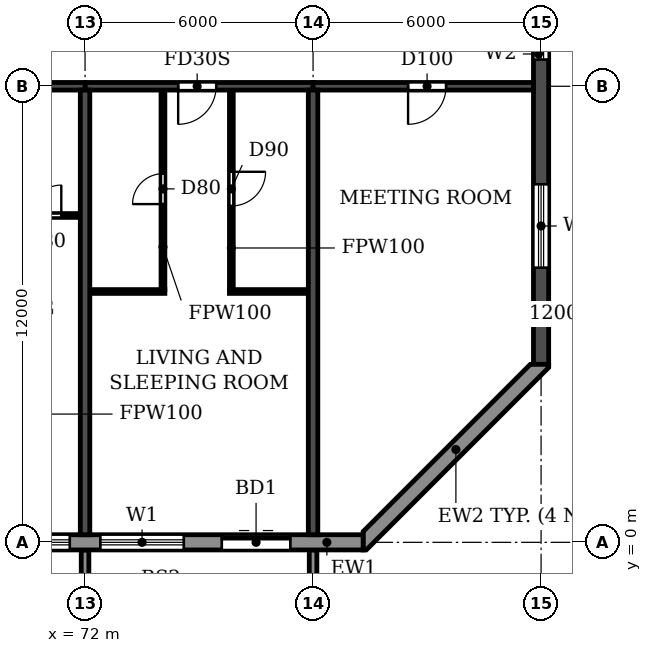
"""IFC4 building model, lengths in metres.
Left out: names, types, materials, properties, quantities, classifications, styles, units other than length and angle.
Written with IfcOpenShell. Run it as: python <this file> out.ifc"""

import sys

from ifc_helpers import new_model, si_unit, direction, frame, frame_2d, origin, place, context, subcontext, project, spatial, polyline, rectangle, outline, extrude, source, transform, mapped, element, fill, save


model = new_model("IFC4")
c1 = context("Model", 3, precision=1e-05, world=origin(), true_north=direction((0.0, 1.0)))
c2 = subcontext(c1, "Body", "Model", "MODEL_VIEW")
j1 = project(units=[si_unit("LENGTHUNIT", "METRE"), si_unit("PLANEANGLEUNIT", "RADIAN")], contexts=[c1])
p1 = place(None, origin())
s1 = spatial("IfcSite", under=j1, at=p1, CompositionType="ELEMENT")
p2 = place(p1, origin())
s2 = spatial("IfcBuilding", under=s1, at=p2, CompositionType="ELEMENT")
p3 = place(p2, frame((0.0, 0.0, 257.7)))
s3 = spatial("IfcBuildingStorey", under=s2, at=p3, CompositionType="ELEMENT", Elevation=257.7)
for number, where, z_axis, x_axis in (
    (1, (72.0, 0.2, 0.0), (0.0, 0.0, 1.0), (0.0, 1.0, 0.0)),
    (2, (78.0, 0.2, 0.0), (0.0, 0.0, 1.0), (0.0, 1.0, 0.0)),
):
    element("IfcWall", number, at=place(p3, frame(where, z_axis=z_axis, x_axis=x_axis)), inside=s3, PredefinedType="SHEAR", context=c2, shape_type="SweptSolid", body=[
        extrude(rectangle(XDim=11.7, YDim=0.25, at=frame_2d((5.85, 0.0))), origin(), (0.0, 0.0, 1.0), 3.0),
    ])
p4 = place(p3, frame((84.0, 4.683, 0.0), z_axis=(0.0, 0.0, 1.0), x_axis=(0.0, 1.0, 0.0)))
e3 = element("IfcWall", 3, at=p4, inside=s3, PredefinedType="SHEAR", context=c2, shape_type="SweptSolid", body=[
    extrude(rectangle(XDim=31.834, YDim=0.4, at=frame_2d((15.917, 0.0))), origin(), (0.0, 0.0, 1.0), 3.0),
])
p5 = place(p4, frame((23.817, 0.0, 0.9)))
e4 = element("IfcOpeningElement", 4, at=p5, cuts=e3, PredefinedType="OPENING", context=c2, shape_type="SweptSolid", body=[
    extrude(rectangle(XDim=1.2, YDim=1.5, at=frame_2d((0.6, 0.75))), frame((0.0, 0.21, 0.0), z_axis=(0.0, -1.0, 0.0), x_axis=(1.0, 0.0, 0.0)), (0.0, 0.0, 1.0), 0.42),
])
p6 = place(p4, frame((8.017, 0.0, 0.9)))
e5 = element("IfcOpeningElement", 5, at=p6, cuts=e3, PredefinedType="OPENING", context=c2, shape_type="SweptSolid", body=[
    extrude(rectangle(XDim=1.2, YDim=1.5, at=frame_2d((0.6, 0.75))), frame((0.0, 0.21, 0.0), z_axis=(0.0, -1.0, 0.0), x_axis=(1.0, 0.0, 0.0)), (0.0, 0.0, 1.0), 0.42),
])
p7 = place(p4, frame((27.694, 0.0, 0.6)))
e6 = element("IfcOpeningElement", 6, at=p7, cuts=e3, PredefinedType="OPENING", context=c2, shape_type="SweptSolid", body=[
    extrude(rectangle(XDim=2.2, YDim=1.8, at=frame_2d((1.1, 0.9))), frame((0.0, 0.21, 0.0), z_axis=(0.0, -1.0, 0.0), x_axis=(1.0, 0.0, 0.0)), (0.0, 0.0, 1.0), 0.42),
])
p8 = place(p4, frame((2.541, 0.0, 0.6)))
e7 = element("IfcOpeningElement", 7, at=p8, cuts=e3, PredefinedType="OPENING", context=c2, shape_type="SweptSolid", body=[
    extrude(rectangle(XDim=2.2, YDim=1.8, at=frame_2d((1.1, 0.9))), frame((0.0, 0.21, 0.0), z_axis=(0.0, -1.0, 0.0), x_axis=(1.0, 0.0, 0.0)), (0.0, 0.0, 1.0), 0.42),
])
p9 = place(p4, frame((15.917, 0.0, 0.9)))
e8 = element("IfcOpeningElement", 8, at=p9, cuts=e3, PredefinedType="OPENING", context=c2, shape_type="SweptSolid", body=[
    extrude(rectangle(XDim=1.2, YDim=1.5, at=frame_2d((0.6, 0.75))), frame((0.0, 0.21, 0.0), z_axis=(0.0, -1.0, 0.0), x_axis=(1.0, 0.0, 0.0)), (0.0, 0.0, 1.0), 0.42),
])
p10 = place(p3, frame((66.0, 12.0, 0.0), z_axis=(0.0, 0.0, 1.0), x_axis=(1.0, 0.0, 0.0)))
e9 = element("IfcWall", 9, at=p10, inside=s3, PredefinedType="SHEAR", context=c2, shape_type="SweptSolid", body=[
    extrude(rectangle(XDim=6.0, YDim=0.2, at=frame_2d((3.0, 0.0))), origin(), (0.0, 0.0, 1.0), 2.4),
])
p11 = place(p10, frame((2.55, 0.0, 0.0)))
e10 = element("IfcOpeningElement", 10, at=p11, cuts=e9, PredefinedType="OPENING", context=c2, shape_type="SweptSolid", body=[
    extrude(rectangle(XDim=1.0, YDim=2.1, at=frame_2d((0.5, 1.05))), frame((0.0, 0.11, 0.0), z_axis=(0.0, -1.0, 0.0), x_axis=(1.0, 0.0, 0.0)), (0.0, 0.0, 1.0), 0.22),
])
p12 = place(p3, frame((72.0, 12.0, 0.0), z_axis=(0.0, 0.0, 1.0), x_axis=(1.0, 0.0, 0.0)))
e11 = element("IfcWall", 11, at=p12, inside=s3, PredefinedType="SHEAR", context=c2, shape_type="SweptSolid", body=[
    extrude(rectangle(XDim=6.0, YDim=0.2, at=frame_2d((3.0, 0.0))), origin(), (0.0, 0.0, 1.0), 2.4),
])
p13 = place(p12, frame((2.45, 0.0, 0.0)))
e12 = element("IfcOpeningElement", 12, at=p13, cuts=e11, PredefinedType="OPENING", context=c2, shape_type="SweptSolid", body=[
    extrude(rectangle(XDim=1.0, YDim=2.1, at=frame_2d((0.5, 1.05))), frame((0.0, 0.11, 0.0), z_axis=(0.0, -1.0, 0.0), x_axis=(1.0, 0.0, 0.0)), (0.0, 0.0, 1.0), 0.22),
])
p14 = place(p3, frame((78.0, 12.0, 0.0), z_axis=(0.0, 0.0, 1.0), x_axis=(1.0, 0.0, 0.0)))
e13 = element("IfcWall", 13, at=p14, inside=s3, PredefinedType="SHEAR", context=c2, shape_type="SweptSolid", body=[
    extrude(rectangle(XDim=5.8, YDim=0.2, at=frame_2d((2.9, 0.0))), origin(), (0.0, 0.0, 1.0), 2.4),
])
p15 = place(p14, frame((2.5, 0.0, 0.0)))
e14 = element("IfcOpeningElement", 14, at=p15, cuts=e13, PredefinedType="OPENING", context=c2, shape_type="SweptSolid", body=[
    extrude(rectangle(XDim=1.0, YDim=2.1, at=frame_2d((0.5, 1.05))), frame((0.0, 0.11, 0.0), z_axis=(0.0, -1.0, 0.0), x_axis=(1.0, 0.0, 0.0)), (0.0, 0.0, 1.0), 0.22),
])
p16 = place(p3, frame((22.683, 0.0, 0.0), z_axis=(0.0, 0.0, 1.0), x_axis=(1.0, 0.0, 0.0)))
e15 = element("IfcWall", 15, at=p16, inside=s3, PredefinedType="STANDARD", context=c2, shape_type="SweptSolid", body=[
    extrude(rectangle(XDim=56.634, YDim=0.4, at=frame_2d((28.317, 0.0))), origin(), (0.0, 0.0, 1.0), 3.0),
])
p17 = place(p16, frame((1.717, 0.0, 0.9)))
e16 = element("IfcOpeningElement", 16, at=p17, cuts=e15, PredefinedType="OPENING", context=c2, shape_type="SweptSolid", body=[
    extrude(rectangle(XDim=2.2, YDim=1.5, at=frame_2d((1.1, 0.75))), frame((0.0, 0.21, 0.0), z_axis=(0.0, -1.0, 0.0), x_axis=(1.0, 0.0, 0.0)), (0.0, 0.0, 1.0), 0.42),
])
p18 = place(p16, frame((4.917, 0.0, 0.0)))
e17 = element("IfcOpeningElement", 17, at=p18, cuts=e15, PredefinedType="OPENING", context=c2, shape_type="SweptSolid", body=[
    extrude(rectangle(XDim=1.8, YDim=2.4, at=frame_2d((0.9, 1.2))), frame((0.0, 0.21, 0.0), z_axis=(0.0, -1.0, 0.0), x_axis=(1.0, 0.0, 0.0)), (0.0, 0.0, 1.0), 0.42),
])
p19 = place(p16, frame((7.717, 0.0, 0.9)))
e18 = element("IfcOpeningElement", 18, at=p19, cuts=e15, PredefinedType="OPENING", context=c2, shape_type="SweptSolid", body=[
    extrude(rectangle(XDim=2.2, YDim=1.5, at=frame_2d((1.1, 0.75))), frame((0.0, 0.21, 0.0), z_axis=(0.0, -1.0, 0.0), x_axis=(1.0, 0.0, 0.0)), (0.0, 0.0, 1.0), 0.42),
])
p20 = place(p16, frame((10.717, 0.0, 0.9)))
e19 = element("IfcOpeningElement", 19, at=p20, cuts=e15, PredefinedType="OPENING", context=c2, shape_type="SweptSolid", body=[
    extrude(rectangle(XDim=2.2, YDim=1.5, at=frame_2d((1.1, 0.75))), frame((0.0, 0.21, 0.0), z_axis=(0.0, -1.0, 0.0), x_axis=(1.0, 0.0, 0.0)), (0.0, 0.0, 1.0), 0.42),
])
p21 = place(p16, frame((13.717, 0.0, 0.9)))
e20 = element("IfcOpeningElement", 20, at=p21, cuts=e15, PredefinedType="OPENING", context=c2, shape_type="SweptSolid", body=[
    extrude(rectangle(XDim=2.2, YDim=1.5, at=frame_2d((1.1, 0.75))), frame((0.0, 0.21, 0.0), z_axis=(0.0, -1.0, 0.0), x_axis=(1.0, 0.0, 0.0)), (0.0, 0.0, 1.0), 0.42),
])
p22 = place(p16, frame((16.917, 0.0, 0.0)))
e21 = element("IfcOpeningElement", 21, at=p22, cuts=e15, PredefinedType="OPENING", context=c2, shape_type="SweptSolid", body=[
    extrude(rectangle(XDim=1.8, YDim=2.4, at=frame_2d((0.9, 1.2))), frame((0.0, 0.21, 0.0), z_axis=(0.0, -1.0, 0.0), x_axis=(1.0, 0.0, 0.0)), (0.0, 0.0, 1.0), 0.42),
])
p23 = place(p16, frame((19.717, 0.0, 0.9)))
e22 = element("IfcOpeningElement", 22, at=p23, cuts=e15, PredefinedType="OPENING", context=c2, shape_type="SweptSolid", body=[
    extrude(rectangle(XDim=2.2, YDim=1.5, at=frame_2d((1.1, 0.75))), frame((0.0, 0.21, 0.0), z_axis=(0.0, -1.0, 0.0), x_axis=(1.0, 0.0, 0.0)), (0.0, 0.0, 1.0), 0.42),
])
p24 = place(p16, frame((22.717, 0.0, 0.9)))
e23 = element("IfcOpeningElement", 23, at=p24, cuts=e15, PredefinedType="OPENING", context=c2, shape_type="SweptSolid", body=[
    extrude(rectangle(XDim=2.2, YDim=1.5, at=frame_2d((1.1, 0.75))), frame((0.0, 0.21, 0.0), z_axis=(0.0, -1.0, 0.0), x_axis=(1.0, 0.0, 0.0)), (0.0, 0.0, 1.0), 0.42),
])
p25 = place(p16, frame((25.717, 0.0, 0.9)))
e24 = element("IfcOpeningElement", 24, at=p25, cuts=e15, PredefinedType="OPENING", context=c2, shape_type="SweptSolid", body=[
    extrude(rectangle(XDim=2.2, YDim=1.5, at=frame_2d((1.1, 0.75))), frame((0.0, 0.21, 0.0), z_axis=(0.0, -1.0, 0.0), x_axis=(1.0, 0.0, 0.0)), (0.0, 0.0, 1.0), 0.42),
])
p26 = place(p16, frame((28.917, 0.0, 0.0)))
e25 = element("IfcOpeningElement", 25, at=p26, cuts=e15, PredefinedType="OPENING", context=c2, shape_type="SweptSolid", body=[
    extrude(rectangle(XDim=1.8, YDim=2.4, at=frame_2d((0.9, 1.2))), frame((0.0, 0.21, 0.0), z_axis=(0.0, -1.0, 0.0), x_axis=(1.0, 0.0, 0.0)), (0.0, 0.0, 1.0), 0.42),
])
p27 = place(p16, frame((31.717, 0.0, 0.9)))
e26 = element("IfcOpeningElement", 26, at=p27, cuts=e15, PredefinedType="OPENING", context=c2, shape_type="SweptSolid", body=[
    extrude(rectangle(XDim=2.2, YDim=1.5, at=frame_2d((1.1, 0.75))), frame((0.0, 0.21, 0.0), z_axis=(0.0, -1.0, 0.0), x_axis=(1.0, 0.0, 0.0)), (0.0, 0.0, 1.0), 0.42),
])
p28 = place(p16, frame((34.717, 0.0, 0.9)))
e27 = element("IfcOpeningElement", 27, at=p28, cuts=e15, PredefinedType="OPENING", context=c2, shape_type="SweptSolid", body=[
    extrude(rectangle(XDim=2.2, YDim=1.5, at=frame_2d((1.1, 0.75))), frame((0.0, 0.21, 0.0), z_axis=(0.0, -1.0, 0.0), x_axis=(1.0, 0.0, 0.0)), (0.0, 0.0, 1.0), 0.42),
])
p29 = place(p16, frame((37.717, 0.0, 0.9)))
e28 = element("IfcOpeningElement", 28, at=p29, cuts=e15, PredefinedType="OPENING", context=c2, shape_type="SweptSolid", body=[
    extrude(rectangle(XDim=2.2, YDim=1.5, at=frame_2d((1.1, 0.75))), frame((0.0, 0.21, 0.0), z_axis=(0.0, -1.0, 0.0), x_axis=(1.0, 0.0, 0.0)), (0.0, 0.0, 1.0), 0.42),
])
p30 = place(p16, frame((40.917, 0.0, 0.0)))
e29 = element("IfcOpeningElement", 29, at=p30, cuts=e15, PredefinedType="OPENING", context=c2, shape_type="SweptSolid", body=[
    extrude(rectangle(XDim=1.8, YDim=2.4, at=frame_2d((0.9, 1.2))), frame((0.0, 0.21, 0.0), z_axis=(0.0, -1.0, 0.0), x_axis=(1.0, 0.0, 0.0)), (0.0, 0.0, 1.0), 0.42),
])
p31 = place(p16, frame((43.717, 0.0, 0.9)))
e30 = element("IfcOpeningElement", 30, at=p31, cuts=e15, PredefinedType="OPENING", context=c2, shape_type="SweptSolid", body=[
    extrude(rectangle(XDim=2.2, YDim=1.5, at=frame_2d((1.1, 0.75))), frame((0.0, 0.21, 0.0), z_axis=(0.0, -1.0, 0.0), x_axis=(1.0, 0.0, 0.0)), (0.0, 0.0, 1.0), 0.42),
])
p32 = place(p16, frame((46.717, 0.0, 0.9)))
e31 = element("IfcOpeningElement", 31, at=p32, cuts=e15, PredefinedType="OPENING", context=c2, shape_type="SweptSolid", body=[
    extrude(rectangle(XDim=2.2, YDim=1.5, at=frame_2d((1.1, 0.75))), frame((0.0, 0.21, 0.0), z_axis=(0.0, -1.0, 0.0), x_axis=(1.0, 0.0, 0.0)), (0.0, 0.0, 1.0), 0.42),
])
p33 = place(p16, frame((49.717, 0.0, 0.9)))
e32 = element("IfcOpeningElement", 32, at=p33, cuts=e15, PredefinedType="OPENING", context=c2, shape_type="SweptSolid", body=[
    extrude(rectangle(XDim=2.2, YDim=1.5, at=frame_2d((1.1, 0.75))), frame((0.0, 0.21, 0.0), z_axis=(0.0, -1.0, 0.0), x_axis=(1.0, 0.0, 0.0)), (0.0, 0.0, 1.0), 0.42),
])
p34 = place(p16, frame((52.917, 0.0, 0.0)))
e33 = element("IfcOpeningElement", 33, at=p34, cuts=e15, PredefinedType="OPENING", context=c2, shape_type="SweptSolid", body=[
    extrude(rectangle(XDim=1.8, YDim=2.4, at=frame_2d((0.9, 1.2))), frame((0.0, 0.21, 0.0), z_axis=(0.0, -1.0, 0.0), x_axis=(1.0, 0.0, 0.0)), (0.0, 0.0, 1.0), 0.42),
])
p35 = place(p3, origin())
e34 = element("IfcWall", 34, at=p35, inside=s3, PredefinedType="STANDARD", context=c2, shape_type="SweptSolid", body=[
    extrude(outline(polyline([(79.317, -0.2), (79.4, -0.2), (84.2, 4.6), (84.2, 4.683), (83.717, 4.683), (79.317, 0.283), (79.317, -0.2)])), origin(), (0.0, 0.0, 1.0), 3.0),
])
m1 = source(origin(), c2, "Body", "SweptSolid", [
    extrude(outline(polyline([(0.0, 0.0), (0.2, 0.0), (0.2, 1.65), (0.0, 1.65), (0.0, 0.0)])), origin(), (0.0, 0.0, 1.0), 3.1),
])
for number, where in (
    (35, (71.9, -1.85, 0.0)),
    (36, (77.9, -1.85, 0.0)),
):
    element("IfcWall", number, at=place(p3, frame(where)), inside=s3, PredefinedType="STANDARD", context=c2, shape_type="MappedRepresentation", body=[
        mapped(m1, transform((0.0, 0.0, 0.0))),
    ])
p36 = place(p3, frame((72.135, 6.6, 0.0), z_axis=(0.0, 0.0, 1.0), x_axis=(1.0, 0.0, 0.0)))
e37 = element("IfcWall", 37, at=p36, inside=s3, PredefinedType="PARTITIONING", context=c2, shape_type="SweptSolid", body=[
    extrude(rectangle(XDim=1.965, YDim=0.1, at=frame_2d((0.982, 0.0))), origin(), (0.0, 0.0, 1.0), 3.0),
])
p37 = place(p3, frame((75.8, 6.6, 0.0), z_axis=(0.0, 0.0, 1.0), x_axis=(1.0, 0.0, 0.0)))
e38 = element("IfcWall", 38, at=p37, inside=s3, PredefinedType="PARTITIONING", context=c2, shape_type="SweptSolid", body=[
    extrude(rectangle(XDim=2.065, YDim=0.1, at=frame_2d((1.032, 0.0))), origin(), (0.0, 0.0, 1.0), 3.0),
])
p38 = place(p3, frame((69.9, 8.6, 0.0), z_axis=(0.0, 0.0, 1.0), x_axis=(1.0, 0.0, 0.0)))
e39 = element("IfcWall", 39, at=p38, inside=s3, PredefinedType="PARTITIONING", context=c2, shape_type="SweptSolid", body=[
    extrude(rectangle(XDim=1.965, YDim=0.1, at=frame_2d((0.982, 0.0))), origin(), (0.0, 0.0, 1.0), 3.0),
])
p39 = place(p38, frame((0.675, 0.0, 0.0)))
e40 = element("IfcOpeningElement", 40, at=p39, cuts=e39, PredefinedType="OPENING", context=c2, shape_type="SweptSolid", body=[
    extrude(rectangle(XDim=0.8, YDim=2.1, at=frame_2d((0.4, 1.05))), frame((0.0, 0.06, 0.0), z_axis=(0.0, -1.0, 0.0), x_axis=(1.0, 0.0, 0.0)), (0.0, 0.0, 1.0), 0.12),
])
p40 = place(p3, frame((74.05, 6.65, 0.0), z_axis=(0.0, 0.0, 1.0), x_axis=(0.0, 1.0, 0.0)))
e41 = element("IfcWall", 41, at=p40, inside=s3, PredefinedType="PARTITIONING", context=c2, shape_type="SweptSolid", body=[
    extrude(rectangle(XDim=5.24, YDim=0.1, at=frame_2d((2.62, 0.0))), origin(), (0.0, 0.0, 1.0), 3.0),
])
p41 = place(p40, frame((2.25, 0.0, 0.0)))
e42 = element("IfcOpeningElement", 42, at=p41, cuts=e41, PredefinedType="OPENING", context=c2, shape_type="SweptSolid", body=[
    extrude(rectangle(XDim=0.8, YDim=2.1, at=frame_2d((0.4, 1.05))), frame((0.0, 0.06, 0.0), z_axis=(0.0, -1.0, 0.0), x_axis=(1.0, 0.0, 0.0)), (0.0, 0.0, 1.0), 0.12),
])
p42 = place(p3, frame((75.85, 6.65, 0.0), z_axis=(0.0, 0.0, 1.0), x_axis=(0.0, 1.0, 0.0)))
e43 = element("IfcWall", 43, at=p42, inside=s3, PredefinedType="PARTITIONING", context=c2, shape_type="SweptSolid", body=[
    extrude(rectangle(XDim=5.24, YDim=0.1, at=frame_2d((2.62, 0.0))), origin(), (0.0, 0.0, 1.0), 3.0),
])
p43 = place(p42, frame((2.2, 0.0, 0.0)))
e44 = element("IfcOpeningElement", 44, at=p43, cuts=e43, PredefinedType="OPENING", context=c2, shape_type="SweptSolid", body=[
    extrude(rectangle(XDim=0.9, YDim=2.1, at=frame_2d((0.45, 1.05))), frame((0.0, 0.06, 0.0), z_axis=(0.0, -1.0, 0.0), x_axis=(1.0, 0.0, 0.0)), (0.0, 0.0, 1.0), 0.12),
])
p44 = place(p32, origin())
e45 = element("IfcWindow", 45, at=p44, inside=s3, PartitioningType="DOUBLE_PANEL_HORIZONTAL", PredefinedType="WINDOW", context=c2, shape_type="SweptSolid", body=[
    extrude(rectangle(XDim=2.2, YDim=1.5, at=frame_2d((1.1, 0.75))), frame((0.0, 0.03, 0.0), z_axis=(0.0, -1.0, 0.0), x_axis=(1.0, 0.0, 0.0)), (0.0, 0.0, 1.0), 0.06),
])
fill(e31, e45)
p45 = place(p33, origin())
e46 = element("IfcWindow", 46, at=p45, inside=s3, PartitioningType="DOUBLE_PANEL_HORIZONTAL", PredefinedType="WINDOW", context=c2, shape_type="SweptSolid", body=[
    extrude(rectangle(XDim=2.2, YDim=1.5, at=frame_2d((1.1, 0.75))), frame((0.0, 0.03, 0.0), z_axis=(0.0, -1.0, 0.0), x_axis=(1.0, 0.0, 0.0)), (0.0, 0.0, 1.0), 0.06),
])
fill(e32, e46)
p46 = place(p34, origin())
e47 = element("IfcDoor", 47, at=p46, inside=s3, OperationType="DOUBLE_DOOR_SLIDING", PredefinedType="DOOR", context=c2, shape_type="SweptSolid", body=[
    extrude(rectangle(XDim=1.8, YDim=2.4, at=frame_2d((0.9, 1.2))), frame((0.0, 0.025, 0.0), z_axis=(0.0, -1.0, 0.0), x_axis=(1.0, 0.0, 0.0)), (0.0, 0.0, 1.0), 0.05),
])
fill(e33, e47)
p47 = place(p6, origin())
e48 = element("IfcWindow", 48, at=p47, inside=s3, PartitioningType="SINGLE_PANEL", PredefinedType="WINDOW", context=c2, shape_type="SweptSolid", body=[
    extrude(rectangle(XDim=1.2, YDim=1.5, at=frame_2d((0.6, 0.75))), frame((0.0, 0.03, 0.0), z_axis=(0.0, -1.0, 0.0), x_axis=(1.0, 0.0, 0.0)), (0.0, 0.0, 1.0), 0.06),
])
fill(e5, e48)
p48 = place(p8, origin())
e49 = element("IfcWindow", 49, at=p48, inside=s3, PartitioningType="DOUBLE_PANEL_HORIZONTAL", PredefinedType="WINDOW", context=c2, shape_type="SweptSolid", body=[
    extrude(rectangle(XDim=2.2, YDim=1.8, at=frame_2d((1.1, 0.9))), frame((0.0, 0.03, 0.0), z_axis=(0.0, -1.0, 0.0), x_axis=(1.0, 0.0, 0.0)), (0.0, 0.0, 1.0), 0.06),
])
fill(e7, e49)
p49 = place(p39, origin())
e50 = element("IfcDoor", 50, at=p49, inside=s3, OperationType="SINGLE_SWING_RIGHT", PredefinedType="DOOR", context=c2, shape_type="SweptSolid", body=[
    extrude(rectangle(XDim=0.8, YDim=2.1, at=frame_2d((0.4, 1.05))), frame((0.0, 0.025, 0.0), z_axis=(0.0, -1.0, 0.0), x_axis=(1.0, 0.0, 0.0)), (0.0, 0.0, 1.0), 0.05),
])
fill(e40, e50)
p50 = place(p41, origin())
e51 = element("IfcDoor", 51, at=p50, inside=s3, OperationType="SINGLE_SWING_LEFT", PredefinedType="DOOR", context=c2, shape_type="SweptSolid", body=[
    extrude(rectangle(XDim=0.8, YDim=2.1, at=frame_2d((0.4, 1.05))), frame((0.0, 0.025, 0.0), z_axis=(0.0, -1.0, 0.0), x_axis=(1.0, 0.0, 0.0)), (0.0, 0.0, 1.0), 0.05),
])
fill(e42, e51)
p51 = place(p13, frame((1.0, 0.0, 0.0), z_axis=(0.0, 0.0, 1.0), x_axis=(-1.0, 0.0, 0.0)))
e52 = element("IfcDoor", 52, at=p51, inside=s3, OperationType="SINGLE_SWING_RIGHT", PredefinedType="DOOR", context=c2, shape_type="SweptSolid", body=[
    extrude(rectangle(XDim=1.0, YDim=2.1, at=frame_2d((0.5, 1.05))), frame((0.0, 0.025, 0.0), z_axis=(0.0, -1.0, 0.0), x_axis=(1.0, 0.0, 0.0)), (0.0, 0.0, 1.0), 0.05),
])
fill(e12, e52)
p52 = place(p43, frame((0.9, 0.0, 0.0), z_axis=(0.0, 0.0, 1.0), x_axis=(-1.0, 0.0, 0.0)))
e53 = element("IfcDoor", 53, at=p52, inside=s3, OperationType="SINGLE_SWING_LEFT", PredefinedType="DOOR", context=c2, shape_type="SweptSolid", body=[
    extrude(rectangle(XDim=0.9, YDim=2.1, at=frame_2d((0.45, 1.05))), frame((0.0, 0.025, 0.0), z_axis=(0.0, -1.0, 0.0), x_axis=(1.0, 0.0, 0.0)), (0.0, 0.0, 1.0), 0.05),
])
fill(e44, e53)
p53 = place(p15, frame((1.0, 0.0, 0.0), z_axis=(0.0, 0.0, 1.0), x_axis=(-1.0, 0.0, 0.0)))
e54 = element("IfcDoor", 54, at=p53, inside=s3, OperationType="SINGLE_SWING_RIGHT", PredefinedType="DOOR", context=c2, shape_type="SweptSolid", body=[
    extrude(rectangle(XDim=1.0, YDim=2.1, at=frame_2d((0.5, 1.05))), frame((0.0, 0.025, 0.0), z_axis=(0.0, -1.0, 0.0), x_axis=(1.0, 0.0, 0.0)), (0.0, 0.0, 1.0), 0.05),
])
fill(e14, e54)
save(model, sys.argv[1])
